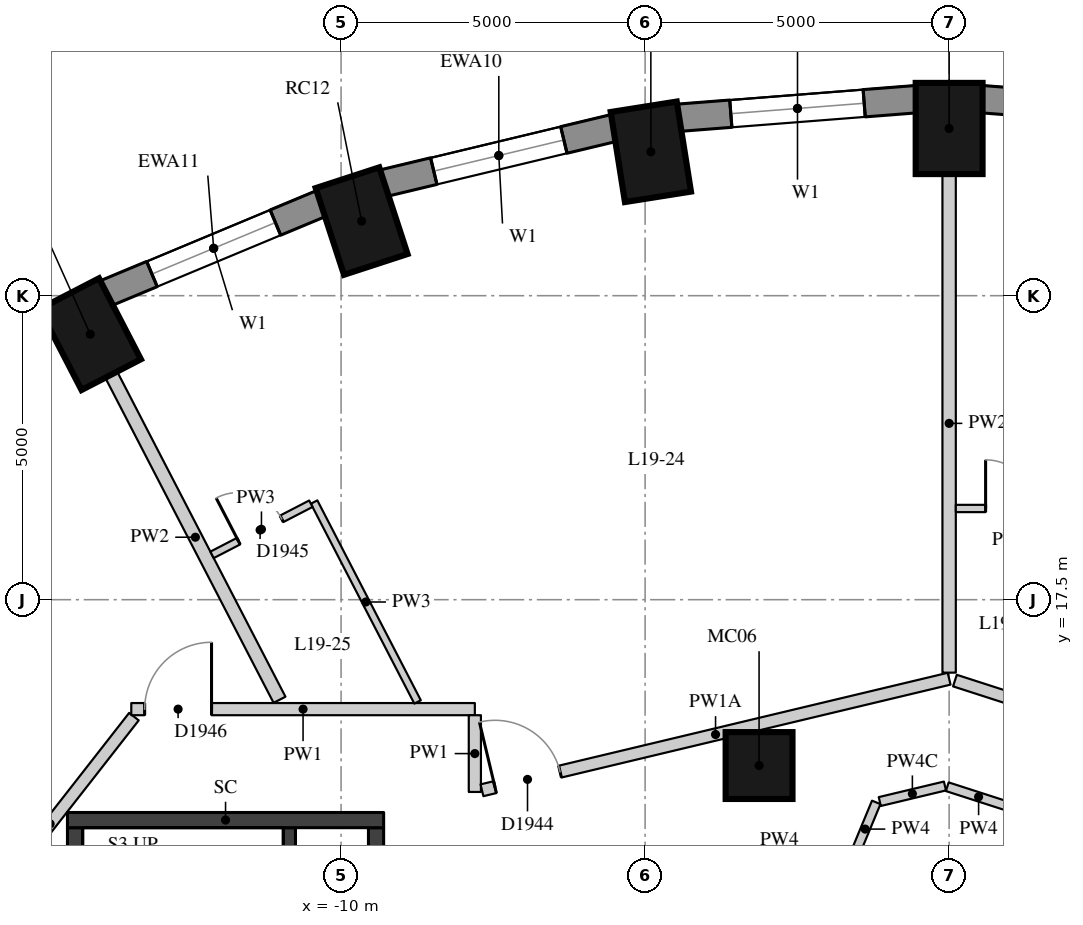
"""IFC4 building model, lengths in metres.
Left out: names, types, materials, properties, quantities, classifications, styles, units other than length and angle.
Written with IfcOpenShell. Run it as: python <this file> out.ifc"""

import sys

from ifc_helpers import new_model, si_unit, direction, frame, frame_2d, origin, origin_2d, place, context, subcontext, project, spatial, rectangle, extrude, element, fill, save


model = new_model("IFC4")
c1 = context("Model", 3, precision=1e-05, world=origin(), true_north=direction((0.0, 1.0)))
c2 = subcontext(c1, "Body", "Model", "MODEL_VIEW")
j1 = project(units=[si_unit("LENGTHUNIT", "METRE"), si_unit("PLANEANGLEUNIT", "RADIAN")], contexts=[c1])
p1 = place(None, origin())
s1 = spatial("IfcSite", under=j1, at=p1, CompositionType="ELEMENT")
p2 = place(p1, origin())
s2 = spatial("IfcBuilding", under=s1, at=p2, CompositionType="ELEMENT")
p3 = place(p2, frame((0.0, 0.0, 71.2)))
s3 = spatial("IfcBuildingStorey", under=s2, at=p3, CompositionType="ELEMENT", Elevation=71.2)
for number, where, z_axis, x_axis in (
    (1, (0.0, 25.25, 0.0), (0.0, 0.0, 1.0), (0.0, 1.0, 0.0)),
    (2, (-4.906, 24.866, 0.0), (0.0, 0.0, 1.0), (-0.156, 0.988, 0.0)),
    (3, (-9.662, 23.727, 0.0), (0.0, 0.0, 1.0), (-0.31, 0.951, 0.0)),
    (4, (-14.125, 21.867, 0.0), (0.0, 0.0, 1.0), (-0.46, 0.888, 0.0)),
):
    element("IfcColumn", number, at=place(p3, frame(where, z_axis=z_axis, x_axis=x_axis)), inside=s3, PredefinedType="COLUMN", context=c2, shape_type="SweptSolid", body=[
        extrude(rectangle(XDim=1.5, YDim=1.1, at=origin_2d()), origin(), (0.0, 0.0, 1.0), 3.3),
    ])
p4 = place(p3, frame((-3.126, 14.772, 0.0), z_axis=(0.0, 0.0, 1.0), x_axis=(1.0, 0.0, 0.0)))
e5 = element("IfcColumn", 5, at=p4, inside=s3, PredefinedType="COLUMN", context=c2, shape_type="SweptSolid", body=[
    extrude(rectangle(XDim=1.1, YDim=1.1, at=origin_2d()), origin(), (0.0, 0.0, 1.0), 3.3),
])
p5 = place(p3, frame((4.457, 25.426, 0.0), z_axis=(0.0, 0.0, 1.0), x_axis=(-0.996955972145, 0.077966592873, 0.0)))
e6 = element("IfcWall", 6, at=p5, inside=s3, PredefinedType="SOLIDWALL", context=c2, shape_type="SweptSolid", body=[
    extrude(rectangle(XDim=3.939, YDim=0.45, at=frame_2d((1.97, 0.0))), origin(), (0.0, 0.0, 1.0), 3.02),
])
p6 = place(p5, frame((0.87, 0.0, 0.4)))
e7 = element("IfcOpeningElement", 7, at=p6, cuts=e6, PredefinedType="OPENING", context=c2, shape_type="SweptSolid", body=[
    extrude(rectangle(XDim=2.2, YDim=1.75, at=frame_2d((1.1, 0.875))), frame((0.0, 0.235, 0.0), z_axis=(0.0, -1.0, 0.0), x_axis=(1.0, 0.0, 0.0)), (0.0, 0.0, 1.0), 0.47),
])
p7 = place(p3, frame((-0.53, 25.733, 0.0), z_axis=(0.0, 0.0, 1.0), x_axis=(-0.996955972145, -0.077966592873, 0.0)))
e8 = element("IfcWall", 8, at=p7, inside=s3, PredefinedType="SOLIDWALL", context=c2, shape_type="SweptSolid", body=[
    extrude(rectangle(XDim=3.939, YDim=0.45, at=frame_2d((1.97, 0.0))), origin(), (0.0, 0.0, 1.0), 3.02),
])
p8 = place(p7, frame((0.87, 0.0, 0.4)))
e9 = element("IfcOpeningElement", 9, at=p8, cuts=e8, PredefinedType="OPENING", context=c2, shape_type="SweptSolid", body=[
    extrude(rectangle(XDim=2.2, YDim=1.75, at=frame_2d((1.1, 0.875))), frame((0.0, 0.235, 0.0), z_axis=(0.0, -1.0, 0.0), x_axis=(1.0, 0.0, 0.0)), (0.0, 0.0, 1.0), 0.47),
])
p9 = place(p3, frame((-5.504, 25.26, 0.0), z_axis=(0.0, 0.0, 1.0), x_axis=(-0.972496561493, -0.232917233979, 0.0)))
e10 = element("IfcWall", 10, at=p9, inside=s3, PredefinedType="SOLIDWALL", context=c2, shape_type="SweptSolid", body=[
    extrude(rectangle(XDim=3.911, YDim=0.45, at=frame_2d((1.956, 0.0))), origin(), (0.0, 0.0, 1.0), 3.02),
])
p10 = place(p9, frame((0.855, 0.0, 0.4)))
e11 = element("IfcOpeningElement", 11, at=p10, cuts=e10, PredefinedType="OPENING", context=c2, shape_type="SweptSolid", body=[
    extrude(rectangle(XDim=2.2, YDim=1.75, at=frame_2d((1.1, 0.875))), frame((0.0, 0.235, 0.0), z_axis=(0.0, -1.0, 0.0), x_axis=(1.0, 0.0, 0.0)), (0.0, 0.0, 1.0), 0.47),
])
p11 = place(p3, frame((-10.315, 24.021, 0.0), z_axis=(0.0, 0.0, 1.0), x_axis=(-0.923031964282, -0.384723267966, 0.0)))
e12 = element("IfcWall", 12, at=p11, inside=s3, PredefinedType="SOLIDWALL", context=c2, shape_type="SweptSolid", body=[
    extrude(rectangle(XDim=3.856, YDim=0.45, at=frame_2d((1.928, 0.0))), origin(), (0.0, 0.0, 1.0), 3.02),
])
p12 = place(p11, frame((0.828, 0.0, 0.4)))
e13 = element("IfcOpeningElement", 13, at=p12, cuts=e12, PredefinedType="OPENING", context=c2, shape_type="SweptSolid", body=[
    extrude(rectangle(XDim=2.2, YDim=1.75, at=frame_2d((1.1, 0.875))), frame((0.0, 0.235, 0.0), z_axis=(0.0, -1.0, 0.0), x_axis=(1.0, 0.0, 0.0)), (0.0, 0.0, 1.0), 0.47),
])
p13 = place(p3, frame((-14.817, 22.051, 0.0), z_axis=(0.0, 0.0, 1.0), x_axis=(-0.847635480093, -0.530579016629, 0.0)))
e14 = element("IfcWall", 14, at=p13, inside=s3, PredefinedType="SOLIDWALL", context=c2, shape_type="SweptSolid", body=[
    extrude(rectangle(XDim=3.782, YDim=0.45, at=frame_2d((1.891, 0.0))), origin(), (0.0, 0.0, 1.0), 3.02),
])
p14 = place(p13, frame((0.791, 0.0, 0.4)))
e15 = element("IfcOpeningElement", 15, at=p14, cuts=e14, PredefinedType="OPENING", context=c2, shape_type="SweptSolid", body=[
    extrude(rectangle(XDim=2.2, YDim=1.75, at=frame_2d((1.1, 0.875))), frame((0.0, 0.235, 0.0), z_axis=(0.0, -1.0, 0.0), x_axis=(1.0, 0.0, 0.0)), (0.0, 0.0, 1.0), 0.47),
])
p15 = place(p3, frame((-10.85, 7.75, 0.0), z_axis=(0.0, 0.0, 1.0), x_axis=(0.0, 1.0, 0.0)))
e16 = element("IfcWall", 16, at=p15, inside=s3, PredefinedType="SHEAR", context=c2, shape_type="SweptSolid", body=[
    extrude(rectangle(XDim=6.0, YDim=0.2, at=frame_2d((3.0, 0.0))), origin(), (0.0, 0.0, 1.0), 3.02),
])
p16 = place(p15, frame((0.1, 0.0, 0.0)))
e17 = element("IfcOpeningElement", 17, at=p16, cuts=e16, PredefinedType="OPENING", context=c2, shape_type="SweptSolid", body=[
    extrude(rectangle(XDim=1.5, YDim=2.1, at=frame_2d((0.75, 1.05))), frame((0.0, 0.11, 0.0), z_axis=(0.0, -1.0, 0.0), x_axis=(1.0, 0.0, 0.0)), (0.0, 0.0, 1.0), 0.22),
])
p17 = place(p3, frame((-14.375, 7.75, -0.28), z_axis=(0.0, 0.0, 1.0), x_axis=(0.0, 1.0, 0.0)))
e18 = element("IfcWall", 18, at=p17, inside=s3, PredefinedType="SHEAR", context=c2, shape_type="SweptSolid", body=[
    extrude(rectangle(XDim=6.0, YDim=0.25, at=frame_2d((3.0, 0.0))), origin(), (0.0, 0.0, 1.0), 3.3),
])
p18 = place(p3, frame((-9.425, 7.75, -0.28), z_axis=(0.0, 0.0, 1.0), x_axis=(0.0, 1.0, 0.0)))
e19 = element("IfcWall", 19, at=p18, inside=s3, PredefinedType="SHEAR", context=c2, shape_type="SweptSolid", body=[
    extrude(rectangle(XDim=6.0, YDim=0.25, at=frame_2d((3.0, 0.0))), origin(), (0.0, 0.0, 1.0), 3.3),
])
p19 = place(p18, frame((2.1, 0.0, 0.28)))
e20 = element("IfcOpeningElement", 20, at=p19, cuts=e19, PredefinedType="OPENING", context=c2, shape_type="SweptSolid", body=[
    extrude(rectangle(XDim=1.5, YDim=2.1, at=frame_2d((0.75, 1.05))), frame((0.0, 0.135, 0.0), z_axis=(0.0, -1.0, 0.0), x_axis=(1.0, 0.0, 0.0)), (0.0, 0.0, 1.0), 0.27),
])
p20 = place(p3, frame((-14.5, 13.875, -0.28), z_axis=(0.0, 0.0, 1.0), x_axis=(1.0, 0.0, 0.0)))
e21 = element("IfcWall", 21, at=p20, inside=s3, PredefinedType="SHEAR", context=c2, shape_type="SweptSolid", body=[
    extrude(rectangle(XDim=5.2, YDim=0.25, at=frame_2d((2.6, 0.0))), origin(), (0.0, 0.0, 1.0), 3.3),
])
p21 = place(p3, frame((-16.163, 12.049, 0.0), z_axis=(0.0, 0.0, 1.0), x_axis=(0.6157435057, 0.787946657578, 0.0)))
e22 = element("IfcWall", 22, at=p21, inside=s3, PredefinedType="PARTITIONING", context=c2, shape_type="SweptSolid", body=[
    extrude(rectangle(XDim=4.477, YDim=0.2, at=frame_2d((2.239, 0.0))), origin(), (0.0, 0.0, 1.0), 3.02),
])
p22 = place(p3, frame((-13.45, 15.7, 0.0), z_axis=(0.0, 0.0, 1.0), x_axis=(1.0, 0.0, 0.0)))
e23 = element("IfcWall", 23, at=p22, inside=s3, PredefinedType="PARTITIONING", context=c2, shape_type="SweptSolid", body=[
    extrude(rectangle(XDim=5.65, YDim=0.2, at=frame_2d((2.825, 0.0))), origin(), (0.0, 0.0, 1.0), 3.02),
])
p23 = place(p22, frame((0.22, 0.0, 0.0)))
e24 = element("IfcOpeningElement", 24, at=p23, cuts=e23, PredefinedType="OPENING", context=c2, shape_type="SweptSolid", body=[
    extrude(rectangle(XDim=1.1, YDim=2.1, at=frame_2d((0.55, 1.05))), frame((0.0, 0.11, 0.0), z_axis=(0.0, -1.0, 0.0), x_axis=(1.0, 0.0, 0.0)), (0.0, 0.0, 1.0), 0.22),
])
p24 = place(p3, frame((-7.8, 15.6, 0.0), z_axis=(0.0, 0.0, 1.0), x_axis=(0.0, -1.0, 0.0)))
e25 = element("IfcWall", 25, at=p24, inside=s3, PredefinedType="PARTITIONING", context=c2, shape_type="SweptSolid", body=[
    extrude(rectangle(XDim=1.262, YDim=0.2, at=frame_2d((0.631, 0.0))), origin(), (0.0, 0.0, 1.0), 3.02),
])
p25 = place(p3, frame((-7.683, 14.365, 0.0), z_axis=(0.0, 0.0, 1.0), x_axis=(0.972657109353, 0.23224587752, 0.0)))
e26 = element("IfcWall", 26, at=p25, inside=s3, PredefinedType="PARTITIONING", context=c2, shape_type="SweptSolid", body=[
    extrude(rectangle(XDim=7.899, YDim=0.2, at=frame_2d((3.949, 0.0))), origin(), (0.0, 0.0, 1.0), 2.57),
])
p26 = place(p25, frame((0.22, 0.0, 0.0)))
e27 = element("IfcOpeningElement", 27, at=p26, cuts=e26, PredefinedType="OPENING", context=c2, shape_type="SweptSolid", body=[
    extrude(rectangle(XDim=1.1, YDim=2.1, at=frame_2d((0.55, 1.05))), frame((0.0, 0.11, 0.0), z_axis=(0.0, -1.0, 0.0), x_axis=(1.0, 0.0, 0.0)), (0.0, 0.0, 1.0), 0.22),
])
p27 = place(p3, frame((0.095, 16.169, 0.0), z_axis=(0.0, 0.0, 1.0), x_axis=(0.951667112614, -0.307131416122, 0.0)))
e28 = element("IfcWall", 28, at=p27, inside=s3, PredefinedType="PARTITIONING", context=c2, shape_type="SweptSolid", body=[
    extrude(rectangle(XDim=8.041, YDim=0.2, at=frame_2d((4.02, 0.0))), origin(), (0.0, 0.0, 1.0), 3.02),
])
p28 = place(p27, frame((4.309, 0.0, 0.0)))
e29 = element("IfcOpeningElement", 29, at=p28, cuts=e28, PredefinedType="OPENING", context=c2, shape_type="SweptSolid", body=[
    extrude(rectangle(XDim=1.1, YDim=2.1, at=frame_2d((0.55, 1.05))), frame((0.0, 0.11, 0.0), z_axis=(0.0, -1.0, 0.0), x_axis=(1.0, 0.0, 0.0)), (0.0, 0.0, 1.0), 0.22),
])
p29 = place(p3, frame((-1.563, 13.288, 0.0), z_axis=(0.0, 0.0, 1.0), x_axis=(0.382918810849, 0.923782000419, 0.0)))
e30 = element("IfcWall", 30, at=p29, inside=s3, PredefinedType="PARTITIONING", context=c2, shape_type="SweptSolid", body=[
    extrude(rectangle(XDim=0.951, YDim=0.15, at=frame_2d((0.475, 0.0))), origin(), (0.0, 0.0, 1.0), 3.02),
])
p30 = place(p3, frame((-1.14, 14.18, 0.0), z_axis=(0.0, 0.0, 1.0), x_axis=(0.972668158826, 0.232199596913, 0.0)))
e31 = element("IfcWall", 31, at=p30, inside=s3, PredefinedType="PARTITIONING", context=c2, shape_type="SweptSolid", body=[
    extrude(rectangle(XDim=1.102, YDim=0.15, at=frame_2d((0.551, 0.0))), origin(), (0.0, 0.0, 1.0), 2.42),
])
p31 = place(p3, frame((-0.031, 14.424, 0.0), z_axis=(0.0, 0.0, 1.0), x_axis=(0.951683114319, -0.307081829354, 0.0)))
e32 = element("IfcWall", 32, at=p31, inside=s3, PredefinedType="PARTITIONING", context=c2, shape_type="SweptSolid", body=[
    extrude(rectangle(XDim=1.083, YDim=0.15, at=frame_2d((0.542, 0.0))), origin(), (0.0, 0.0, 1.0), 3.02),
])
p32 = place(p3, frame((0.0, 24.5, 0.0), z_axis=(0.0, 0.0, 1.0), x_axis=(0.0, -1.0, 0.0)))
e33 = element("IfcWall", 33, at=p32, inside=s3, PredefinedType="PARTITIONING", context=c2, shape_type="SweptSolid", body=[
    extrude(rectangle(XDim=8.2, YDim=0.22, at=frame_2d((4.1, 0.0))), origin(), (0.0, 0.0, 1.0), 2.47),
])
p33 = place(p3, frame((-13.78, 21.201, 0.0), z_axis=(0.0, 0.0, 1.0), x_axis=(0.459689820266, -0.888079539875, 0.0)))
e34 = element("IfcWall", 34, at=p33, inside=s3, PredefinedType="PARTITIONING", context=c2, shape_type="SweptSolid", body=[
    extrude(rectangle(XDim=6.021, YDim=0.22, at=frame_2d((3.011, 0.0))), origin(), (0.0, 0.0, 1.0), 3.02),
])
p34 = place(p3, frame((-8.742, 15.818, 0.0), z_axis=(0.0, 0.0, 1.0), x_axis=(-0.45967225044, 0.888088634189, 0.0)))
e35 = element("IfcWall", 35, at=p34, inside=s3, PredefinedType="PARTITIONING", context=c2, shape_type="SweptSolid", body=[
    extrude(rectangle(XDim=3.702, YDim=0.12, at=frame_2d((1.851, 0.0))), origin(), (0.0, 0.0, 1.0), 3.02),
])
p35 = place(p3, frame((1.94, 19.0, 0.0), z_axis=(0.0, 0.0, 1.0), x_axis=(-1.0, 0.0, 0.0)))
e36 = element("IfcWall", 36, at=p35, inside=s3, PredefinedType="PARTITIONING", context=c2, shape_type="SweptSolid", body=[
    extrude(rectangle(XDim=1.83, YDim=0.12, at=frame_2d((0.915, 0.0))), origin(), (0.0, 0.0, 1.0), 3.02),
])
p36 = place(p35, frame((0.54, 0.0, 0.0)))
e37 = element("IfcOpeningElement", 37, at=p36, cuts=e36, PredefinedType="OPENING", context=c2, shape_type="SweptSolid", body=[
    extrude(rectangle(XDim=0.8, YDim=2.1, at=frame_2d((0.4, 1.05))), frame((0.0, 0.07, 0.0), z_axis=(0.0, -1.0, 0.0), x_axis=(1.0, 0.0, 0.0)), (0.0, 0.0, 1.0), 0.14),
])
p37 = place(p3, frame((-10.497, 19.078, 0.0), z_axis=(0.0, 0.0, 1.0), x_axis=(-0.888095574179, -0.459658842104, 0.0)))
e38 = element("IfcWall", 38, at=p37, inside=s3, PredefinedType="PARTITIONING", context=c2, shape_type="SweptSolid", body=[
    extrude(rectangle(XDim=1.83, YDim=0.12, at=frame_2d((0.915, 0.0))), origin(), (0.0, 0.0, 1.0), 3.02),
])
p38 = place(p37, frame((0.54, 0.0, 0.0)))
e39 = element("IfcOpeningElement", 39, at=p38, cuts=e38, PredefinedType="OPENING", context=c2, shape_type="SweptSolid", body=[
    extrude(rectangle(XDim=0.8, YDim=2.1, at=frame_2d((0.4, 1.05))), frame((0.0, 0.07, 0.0), z_axis=(0.0, -1.0, 0.0), x_axis=(1.0, 0.0, 0.0)), (0.0, 0.0, 1.0), 0.14),
])
p39 = place(p8, origin())
e40 = element("IfcWindow", 40, at=p39, inside=s3, PartitioningType="SINGLE_PANEL", PredefinedType="WINDOW", context=c2, shape_type="SweptSolid", body=[
    extrude(rectangle(XDim=2.2, YDim=1.75, at=frame_2d((1.1, 0.875))), frame((0.0, 0.035, 0.0), z_axis=(0.0, -1.0, 0.0), x_axis=(1.0, 0.0, 0.0)), (0.0, 0.0, 1.0), 0.06),
])
fill(e9, e40)
p40 = place(p10, origin())
e41 = element("IfcWindow", 41, at=p40, inside=s3, PartitioningType="SINGLE_PANEL", PredefinedType="WINDOW", context=c2, shape_type="SweptSolid", body=[
    extrude(rectangle(XDim=2.2, YDim=1.75, at=frame_2d((1.1, 0.875))), frame((0.0, 0.035, 0.0), z_axis=(0.0, -1.0, 0.0), x_axis=(1.0, 0.0, 0.0)), (0.0, 0.0, 1.0), 0.06),
])
fill(e11, e41)
p41 = place(p12, origin())
e42 = element("IfcWindow", 42, at=p41, inside=s3, PartitioningType="SINGLE_PANEL", PredefinedType="WINDOW", context=c2, shape_type="SweptSolid", body=[
    extrude(rectangle(XDim=2.2, YDim=1.75, at=frame_2d((1.1, 0.875))), frame((0.0, 0.035, 0.0), z_axis=(0.0, -1.0, 0.0), x_axis=(1.0, 0.0, 0.0)), (0.0, 0.0, 1.0), 0.06),
])
fill(e13, e42)
p42 = place(p36, origin())
e43 = element("IfcDoor", 43, at=p42, inside=s3, OperationType="SINGLE_SWING_LEFT", PredefinedType="DOOR", context=c2, shape_type="SweptSolid", body=[
    extrude(rectangle(XDim=0.8, YDim=2.1, at=frame_2d((0.4, 1.05))), frame((0.0, 0.025, 0.0), z_axis=(0.0, -1.0, 0.0), x_axis=(1.0, 0.0, 0.0)), (0.0, 0.0, 1.0), 0.05),
])
fill(e37, e43)
p43 = place(p26, origin())
e44 = element("IfcDoor", 44, at=p43, inside=s3, OperationType="SINGLE_SWING_LEFT", PredefinedType="DOOR", context=c2, shape_type="SweptSolid", body=[
    extrude(rectangle(XDim=1.1, YDim=2.1, at=frame_2d((0.55, 1.05))), frame((0.0, 0.025, 0.0), z_axis=(0.0, -1.0, 0.0), x_axis=(1.0, 0.0, 0.0)), (0.0, 0.0, 1.0), 0.05),
])
fill(e27, e44)
p44 = place(p38, origin())
e45 = element("IfcDoor", 45, at=p44, inside=s3, OperationType="SINGLE_SWING_LEFT", PredefinedType="DOOR", context=c2, shape_type="SweptSolid", body=[
    extrude(rectangle(XDim=0.8, YDim=2.1, at=frame_2d((0.4, 1.05))), frame((0.0, 0.025, 0.0), z_axis=(0.0, -1.0, 0.0), x_axis=(1.0, 0.0, 0.0)), (0.0, 0.0, 1.0), 0.05),
])
fill(e39, e45)
p45 = place(p23, origin())
e46 = element("IfcDoor", 46, at=p45, inside=s3, OperationType="SINGLE_SWING_RIGHT", PredefinedType="DOOR", context=c2, shape_type="SweptSolid", body=[
    extrude(rectangle(XDim=1.1, YDim=2.1, at=frame_2d((0.55, 1.05))), frame((0.0, 0.025, 0.0), z_axis=(0.0, -1.0, 0.0), x_axis=(1.0, 0.0, 0.0)), (0.0, 0.0, 1.0), 0.05),
])
fill(e24, e46)
save(model, sys.argv[1])
